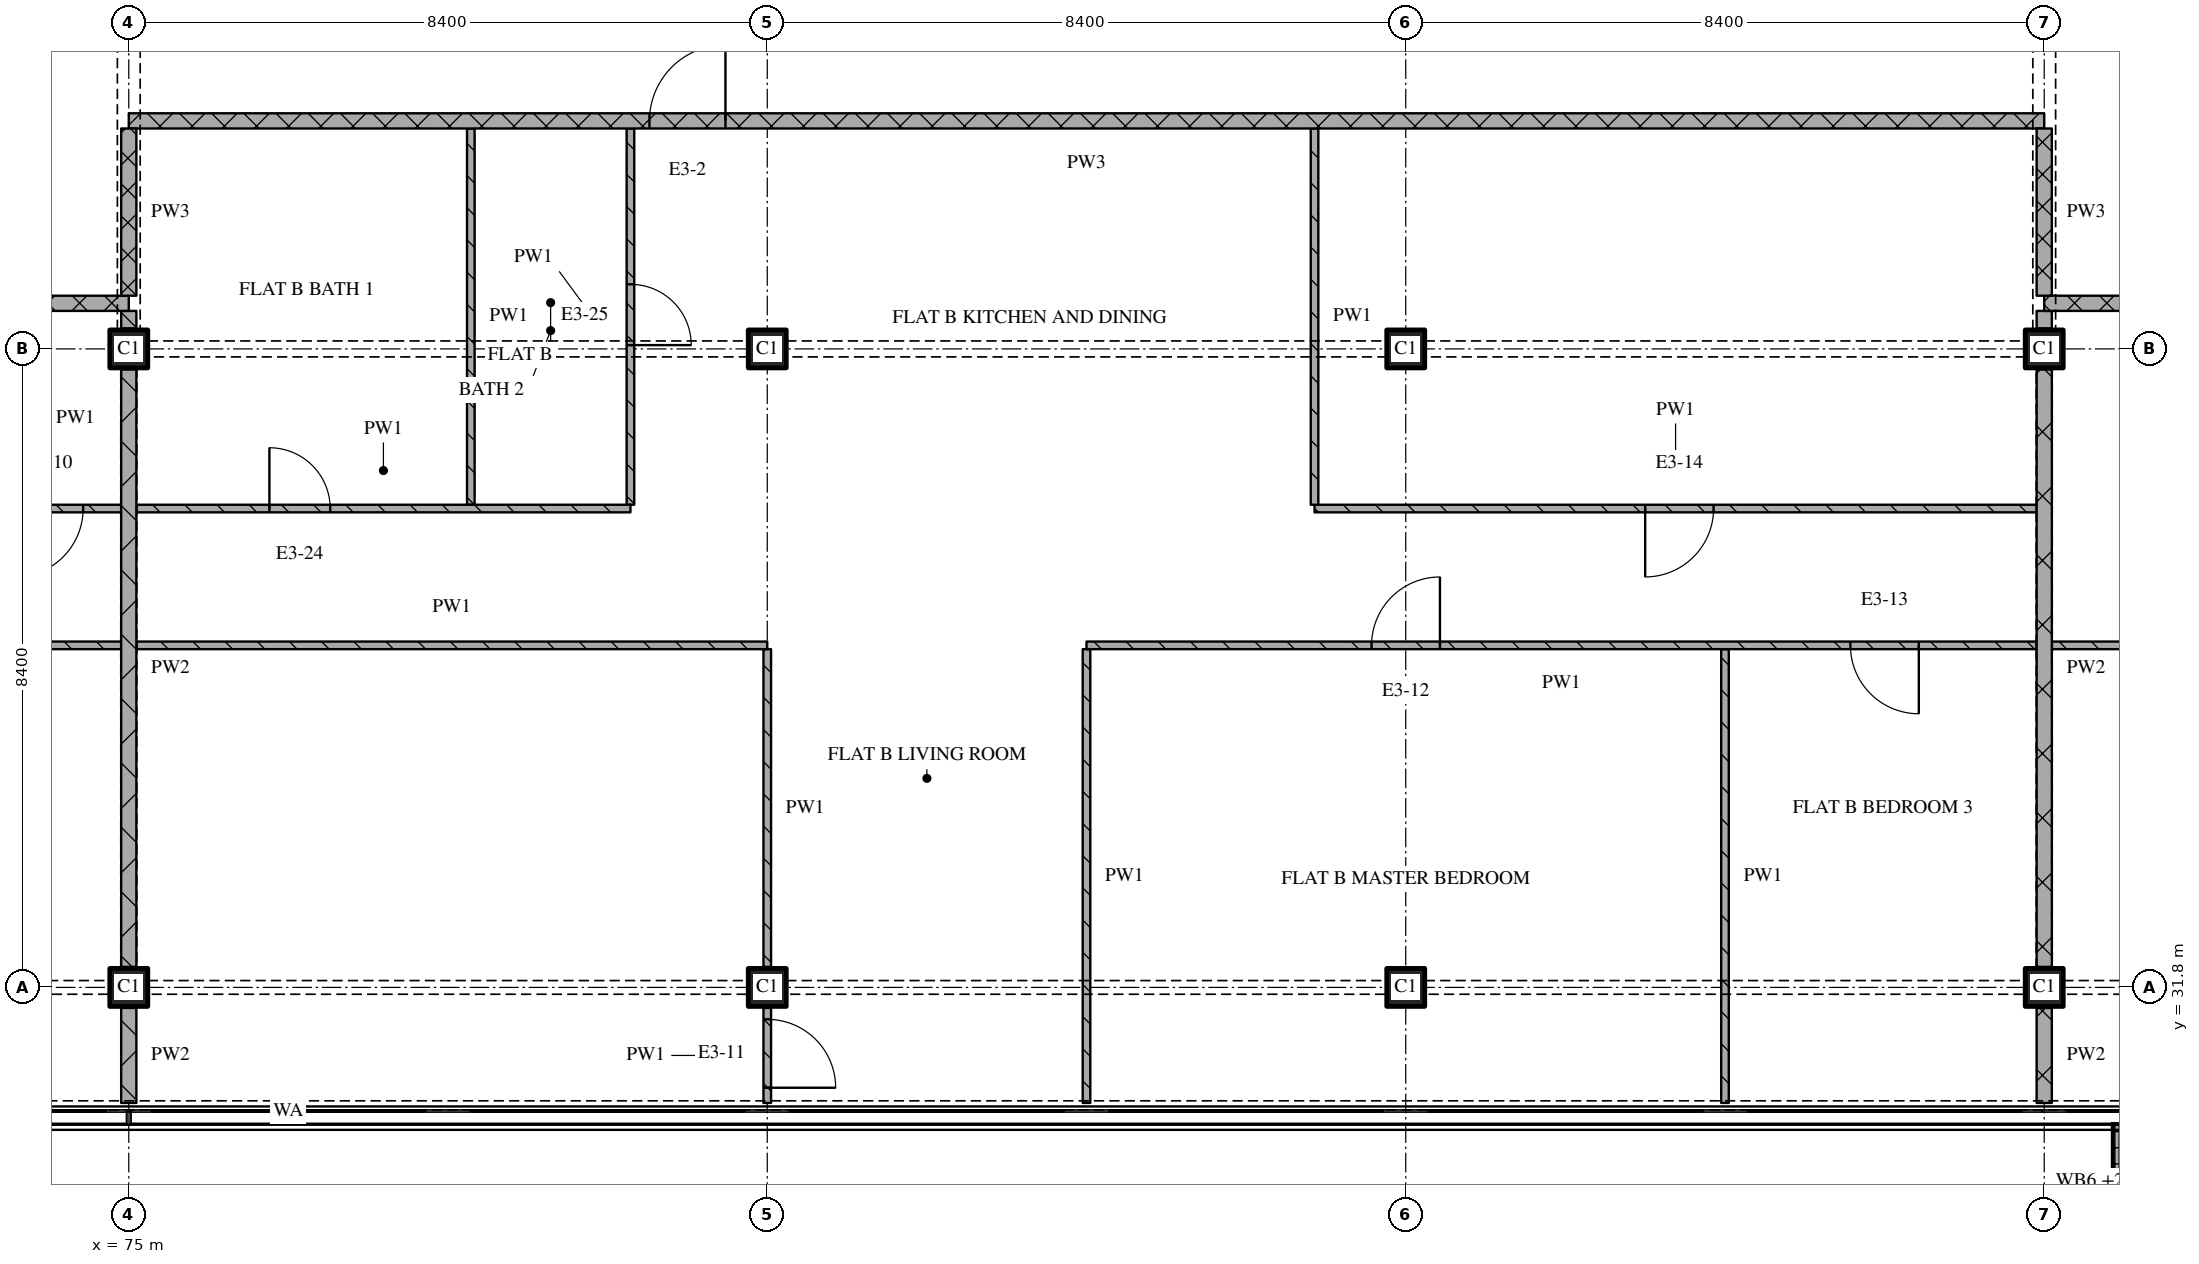
"""IFC4 building model, lengths in metres.
Left out: names, types, materials, properties, quantities, classifications, styles, units other than length and angle.
Written with IfcOpenShell. Run it as: python <this file> out.ifc"""

import sys

from ifc_helpers import new_model, si_unit, direction, frame, frame_2d, origin, origin_2d, place, context, subcontext, project, spatial, polyline, rectangle, outline, extrude, element, fill, save


model = new_model("IFC4")
c1 = context("Model", 3, precision=1e-05, world=origin(), true_north=direction((0.0, 1.0)))
c2 = subcontext(c1, "Body", "Model", "MODEL_VIEW")
j1 = project(units=[si_unit("LENGTHUNIT", "METRE"), si_unit("PLANEANGLEUNIT", "RADIAN")], contexts=[c1])
p1 = place(None, origin())
s1 = spatial("IfcSite", under=j1, at=p1, CompositionType="ELEMENT")
p2 = place(p1, origin())
s2 = spatial("IfcBuilding", under=s1, at=p2, CompositionType="ELEMENT")
p3 = place(p2, frame((0.0, 0.0, 281.55)))
s3 = spatial("IfcBuildingStorey", under=s2, at=p3, CompositionType="ELEMENT", Elevation=281.55)
for number, where, z_axis, x_axis in (
    (1, (75.0, 31.8, 0.0), (0.0, 0.0, 1.0), (1.0, 0.0, 0.0)),
    (2, (75.0, 40.2, 0.0), (0.0, 0.0, 1.0), (1.0, 0.0, 0.0)),
    (3, (83.4, 31.8, 0.0), (0.0, 0.0, 1.0), (1.0, 0.0, 0.0)),
    (4, (83.4, 40.2, 0.0), (0.0, 0.0, 1.0), (1.0, 0.0, 0.0)),
    (5, (91.8, 31.8, 0.0), (0.0, 0.0, 1.0), (1.0, 0.0, 0.0)),
    (6, (91.8, 40.2, 0.0), (0.0, 0.0, 1.0), (1.0, 0.0, 0.0)),
    (7, (100.2, 31.8, 0.0), (0.0, 0.0, 1.0), (1.0, 0.0, 0.0)),
    (8, (100.2, 40.2, 0.0), (0.0, 0.0, 1.0), (1.0, 0.0, 0.0)),
):
    element("IfcColumn", number, at=place(p3, frame(where, z_axis=z_axis, x_axis=x_axis)), inside=s3, PredefinedType="COLUMN", context=c2, shape_type="SweptSolid", body=[
        extrude(rectangle(XDim=0.5, YDim=0.5, at=origin_2d()), origin(), (0.0, 0.0, 1.0), 3.6),
    ])
p4 = place(p3, origin())
e9 = element("IfcWall", 9, at=p4, inside=s3, PredefinedType="SOLIDWALL", context=c2, shape_type="SweptSolid", body=[
    extrude(outline(polyline([(101.1, 30.0), (101.2, 30.0), (101.2, 28.5), (103.4, 28.5), (103.4, 30.0), (103.5, 30.0), (103.5, 28.4), (101.1, 28.4), (101.1, 30.0)])), origin(), (0.0, 0.0, 1.0), 1.0),
])
p5 = place(p3, frame((90.6, 38.1, 0.0), z_axis=(0.0, 0.0, 1.0), x_axis=(1.0, 0.0, 0.0)))
e10 = element("IfcWall", 10, at=p5, inside=s3, PredefinedType="PARTITIONING", context=c2, shape_type="SweptSolid", body=[
    extrude(rectangle(XDim=9.5, YDim=0.1, at=frame_2d((4.75, 0.0))), origin(), (0.0, 0.0, 1.0), 3.32),
])
p6 = place(p5, frame((4.35, 0.0, 0.0)))
e11 = element("IfcOpeningElement", 11, at=p6, cuts=e10, PredefinedType="OPENING", context=c2, shape_type="SweptSolid", body=[
    extrude(rectangle(XDim=0.9, YDim=2.1, at=frame_2d((0.45, 1.05))), frame((0.0, 0.06, 0.0), z_axis=(0.0, -1.0, 0.0), x_axis=(1.0, 0.0, 0.0)), (0.0, 0.0, 1.0), 0.12),
])
p7 = place(p3, frame((75.0, 40.8, 0.0), z_axis=(0.0, 0.0, 1.0), x_axis=(-1.0, 0.0, 0.0)))
e12 = element("IfcWall", 12, at=p7, inside=s3, PredefinedType="PARTITIONING", context=c2, shape_type="SweptSolid", body=[
    extrude(rectangle(XDim=18.32, YDim=0.2, at=frame_2d((9.16, 0.0))), origin(), (0.0, 0.0, 1.0), 3.32),
])
p8 = place(p7, frame((9.85, 0.0, 0.0)))
e13 = element("IfcOpeningElement", 13, at=p8, cuts=e12, PredefinedType="OPENING", context=c2, shape_type="SweptSolid", body=[
    extrude(rectangle(XDim=1.0, YDim=2.1, at=frame_2d((0.5, 1.05))), frame((0.0, 0.11, 0.0), z_axis=(0.0, -1.0, 0.0), x_axis=(1.0, 0.0, 0.0)), (0.0, 0.0, 1.0), 0.22),
])
p9 = place(p3, frame((118.52, 40.8, 0.0), z_axis=(0.0, 0.0, 1.0), x_axis=(-1.0, 0.0, 0.0)))
e14 = element("IfcWall", 14, at=p9, inside=s3, PredefinedType="PARTITIONING", context=c2, shape_type="SweptSolid", body=[
    extrude(rectangle(XDim=18.32, YDim=0.2, at=frame_2d((9.16, 0.0))), origin(), (0.0, 0.0, 1.0), 3.32),
])
p10 = place(p9, frame((7.77, 0.0, 0.0)))
e15 = element("IfcOpeningElement", 15, at=p10, cuts=e14, PredefinedType="OPENING", context=c2, shape_type="SweptSolid", body=[
    extrude(rectangle(XDim=1.0, YDim=2.1, at=frame_2d((0.5, 1.05))), frame((0.0, 0.11, 0.0), z_axis=(0.0, -1.0, 0.0), x_axis=(1.0, 0.0, 0.0)), (0.0, 0.0, 1.0), 0.22),
])
p11 = place(p3, frame((100.2, 43.2, 0.0), z_axis=(0.0, 0.0, 1.0), x_axis=(-1.0, 0.0, 0.0)))
e16 = element("IfcWall", 16, at=p11, inside=s3, PredefinedType="PARTITIONING", context=c2, shape_type="SweptSolid", body=[
    extrude(rectangle(XDim=25.2, YDim=0.2, at=frame_2d((12.6, 0.0))), origin(), (0.0, 0.0, 1.0), 3.32),
])
p12 = place(p11, frame((17.35, 0.0, 0.0)))
e17 = element("IfcOpeningElement", 17, at=p12, cuts=e16, PredefinedType="OPENING", context=c2, shape_type="SweptSolid", body=[
    extrude(rectangle(XDim=1.0, YDim=2.1, at=frame_2d((0.5, 1.05))), frame((0.0, 0.11, 0.0), z_axis=(0.0, -1.0, 0.0), x_axis=(1.0, 0.0, 0.0)), (0.0, 0.0, 1.0), 0.22),
])
p13 = place(p3, frame((75.0, 43.1, 0.0), z_axis=(0.0, 0.0, 1.0), x_axis=(0.0, -1.0, 0.0)))
e18 = element("IfcWall", 18, at=p13, inside=s3, PredefinedType="PARTITIONING", context=c2, shape_type="SweptSolid", body=[
    extrude(rectangle(XDim=2.2, YDim=0.2, at=frame_2d((1.1, 0.0))), origin(), (0.0, 0.0, 1.0), 2.53),
])
p14 = place(p3, frame((75.0, 31.53, 0.0), z_axis=(0.0, 0.0, 1.0), x_axis=(0.0, -1.0, 0.0)))
e19 = element("IfcWall", 19, at=p14, inside=s3, PredefinedType="PARTITIONING", context=c2, shape_type="SweptSolid", body=[
    extrude(rectangle(XDim=1.25, YDim=0.2, at=frame_2d((0.625, 0.0))), origin(), (0.0, 0.0, 1.0), 3.32),
])
p15 = place(p3, frame((75.0, 39.93, 0.0), z_axis=(0.0, 0.0, 1.0), x_axis=(0.0, -1.0, 0.0)))
e20 = element("IfcWall", 20, at=p15, inside=s3, PredefinedType="PARTITIONING", context=c2, shape_type="SweptSolid", body=[
    extrude(rectangle(XDim=7.86, YDim=0.2, at=frame_2d((3.93, 0.0))), origin(), (0.0, 0.0, 1.0), 2.83),
])
p16 = place(p3, frame((75.0, 40.7, 0.0), z_axis=(0.0, 0.0, 1.0), x_axis=(0.0, -1.0, 0.0)))
e21 = element("IfcWall", 21, at=p16, inside=s3, PredefinedType="PARTITIONING", context=c2, shape_type="SweptSolid", body=[
    extrude(rectangle(XDim=0.23, YDim=0.2, at=frame_2d((0.115, 0.0))), origin(), (0.0, 0.0, 1.0), 3.32),
])
p17 = place(p3, frame((79.5, 43.1, 0.0), z_axis=(0.0, 0.0, 1.0), x_axis=(0.0, -1.0, 0.0)))
e22 = element("IfcWall", 22, at=p17, inside=s3, PredefinedType="PARTITIONING", context=c2, shape_type="SweptSolid", body=[
    extrude(rectangle(XDim=4.95, YDim=0.1, at=frame_2d((2.475, 0.0))), origin(), (0.0, 0.0, 1.0), 3.32),
])
p18 = place(p3, frame((81.6, 38.15, 0.0), z_axis=(0.0, 0.0, 1.0), x_axis=(0.0, 1.0, 0.0)))
e23 = element("IfcWall", 23, at=p18, inside=s3, PredefinedType="PARTITIONING", context=c2, shape_type="SweptSolid", body=[
    extrude(rectangle(XDim=4.95, YDim=0.1, at=frame_2d((2.475, 0.0))), origin(), (0.0, 0.0, 1.0), 3.32),
])
p19 = place(p18, frame((2.1, 0.0, 0.0)))
e24 = element("IfcOpeningElement", 24, at=p19, cuts=e23, PredefinedType="OPENING", context=c2, shape_type="SweptSolid", body=[
    extrude(rectangle(XDim=0.8, YDim=2.1, at=frame_2d((0.4, 1.05))), frame((0.0, 0.06, 0.0), z_axis=(0.0, -1.0, 0.0), x_axis=(1.0, 0.0, 0.0)), (0.0, 0.0, 1.0), 0.12),
])
p20 = place(p3, frame((83.4, 30.28, 0.0), z_axis=(0.0, 0.0, 1.0), x_axis=(0.0, 1.0, 0.0)))
e25 = element("IfcWall", 25, at=p20, inside=s3, PredefinedType="PARTITIONING", context=c2, shape_type="SweptSolid", body=[
    extrude(rectangle(XDim=1.25, YDim=0.1, at=frame_2d((0.625, 0.0))), origin(), (0.0, 0.0, 1.0), 3.32),
])
p21 = place(p20, frame((0.2, 0.0, 0.0)))
e26 = element("IfcOpeningElement", 26, at=p21, cuts=e25, PredefinedType="OPENING", context=c2, shape_type="SweptSolid", body=[
    extrude(rectangle(XDim=0.9, YDim=2.1, at=frame_2d((0.45, 1.05))), frame((0.0, 0.06, 0.0), z_axis=(0.0, -1.0, 0.0), x_axis=(1.0, 0.0, 0.0)), (0.0, 0.0, 1.0), 0.12),
])
p22 = place(p3, frame((83.4, 36.25, 0.0), z_axis=(0.0, 0.0, 1.0), x_axis=(0.0, -1.0, 0.0)))
e27 = element("IfcWall", 27, at=p22, inside=s3, PredefinedType="PARTITIONING", context=c2, shape_type="SweptSolid", body=[
    extrude(rectangle(XDim=4.18, YDim=0.1, at=frame_2d((2.09, 0.0))), origin(), (0.0, 0.0, 1.0), 2.83),
])
p23 = place(p3, frame((87.6, 36.25, 0.0), z_axis=(0.0, 0.0, 1.0), x_axis=(0.0, -1.0, 0.0)))
e28 = element("IfcWall", 28, at=p23, inside=s3, PredefinedType="PARTITIONING", context=c2, shape_type="SweptSolid", body=[
    extrude(rectangle(XDim=5.97, YDim=0.1, at=frame_2d((2.985, 0.0))), origin(), (0.0, 0.0, 1.0), 3.32),
])
p24 = place(p3, frame((90.6, 43.1, 0.0), z_axis=(0.0, 0.0, 1.0), x_axis=(0.0, -1.0, 0.0)))
e29 = element("IfcWall", 29, at=p24, inside=s3, PredefinedType="PARTITIONING", context=c2, shape_type="SweptSolid", body=[
    extrude(rectangle(XDim=4.95, YDim=0.1, at=frame_2d((2.475, 0.0))), origin(), (0.0, 0.0, 1.0), 3.32),
])
p25 = place(p3, frame((96.0, 36.25, 0.0), z_axis=(0.0, 0.0, 1.0), x_axis=(0.0, -1.0, 0.0)))
e30 = element("IfcWall", 30, at=p25, inside=s3, PredefinedType="PARTITIONING", context=c2, shape_type="SweptSolid", body=[
    extrude(rectangle(XDim=5.97, YDim=0.1, at=frame_2d((2.985, 0.0))), origin(), (0.0, 0.0, 1.0), 3.32),
])
p26 = place(p3, frame((100.2, 43.1, 0.0), z_axis=(0.0, 0.0, 1.0), x_axis=(0.0, -1.0, 0.0)))
e31 = element("IfcWall", 31, at=p26, inside=s3, PredefinedType="PARTITIONING", context=c2, shape_type="SweptSolid", body=[
    extrude(rectangle(XDim=2.2, YDim=0.2, at=frame_2d((1.1, 0.0))), origin(), (0.0, 0.0, 1.0), 2.53),
])
p27 = place(p3, frame((100.2, 31.53, 0.0), z_axis=(0.0, 0.0, 1.0), x_axis=(0.0, -1.0, 0.0)))
e32 = element("IfcWall", 32, at=p27, inside=s3, PredefinedType="PARTITIONING", context=c2, shape_type="SweptSolid", body=[
    extrude(rectangle(XDim=1.25, YDim=0.2, at=frame_2d((0.625, 0.0))), origin(), (0.0, 0.0, 1.0), 3.32),
])
p28 = place(p3, frame((100.2, 39.93, 0.0), z_axis=(0.0, 0.0, 1.0), x_axis=(0.0, -1.0, 0.0)))
e33 = element("IfcWall", 33, at=p28, inside=s3, PredefinedType="PARTITIONING", context=c2, shape_type="SweptSolid", body=[
    extrude(rectangle(XDim=7.86, YDim=0.2, at=frame_2d((3.93, 0.0))), origin(), (0.0, 0.0, 1.0), 2.83),
])
p29 = place(p3, frame((100.2, 40.7, 0.0), z_axis=(0.0, 0.0, 1.0), x_axis=(0.0, -1.0, 0.0)))
e34 = element("IfcWall", 34, at=p29, inside=s3, PredefinedType="PARTITIONING", context=c2, shape_type="SweptSolid", body=[
    extrude(rectangle(XDim=0.23, YDim=0.2, at=frame_2d((0.115, 0.0))), origin(), (0.0, 0.0, 1.0), 3.32),
])
p30 = place(p3, frame((74.9, 36.3, 0.0), z_axis=(0.0, 0.0, 1.0), x_axis=(-1.0, 0.0, 0.0)))
e35 = element("IfcWall", 35, at=p30, inside=s3, PredefinedType="PARTITIONING", context=c2, shape_type="SweptSolid", body=[
    extrude(rectangle(XDim=8.3, YDim=0.1, at=frame_2d((4.15, 0.0))), origin(), (0.0, 0.0, 1.0), 3.32),
])
p31 = place(p30, frame((3.65, 0.0, 0.0)))
e36 = element("IfcOpeningElement", 36, at=p31, cuts=e35, PredefinedType="OPENING", context=c2, shape_type="SweptSolid", body=[
    extrude(rectangle(XDim=0.9, YDim=2.1, at=frame_2d((0.45, 1.05))), frame((0.0, 0.06, 0.0), z_axis=(0.0, -1.0, 0.0), x_axis=(1.0, 0.0, 0.0)), (0.0, 0.0, 1.0), 0.12),
])
p32 = place(p3, frame((75.1, 36.3, 0.0), z_axis=(0.0, 0.0, 1.0), x_axis=(1.0, 0.0, 0.0)))
e37 = element("IfcWall", 37, at=p32, inside=s3, PredefinedType="PARTITIONING", context=c2, shape_type="SweptSolid", body=[
    extrude(rectangle(XDim=8.3, YDim=0.1, at=frame_2d((4.15, 0.0))), origin(), (0.0, 0.0, 1.0), 3.32),
])
p33 = place(p3, frame((100.1, 36.3, 0.0), z_axis=(0.0, 0.0, 1.0), x_axis=(-1.0, 0.0, 0.0)))
e38 = element("IfcWall", 38, at=p33, inside=s3, PredefinedType="PARTITIONING", context=c2, shape_type="SweptSolid", body=[
    extrude(rectangle(XDim=12.5, YDim=0.1, at=frame_2d((6.25, 0.0))), origin(), (0.0, 0.0, 1.0), 3.32),
])
p34 = place(p33, frame((1.55, 0.0, 0.0)))
e39 = element("IfcOpeningElement", 39, at=p34, cuts=e38, PredefinedType="OPENING", context=c2, shape_type="SweptSolid", body=[
    extrude(rectangle(XDim=0.9, YDim=2.1, at=frame_2d((0.45, 1.05))), frame((0.0, 0.06, 0.0), z_axis=(0.0, -1.0, 0.0), x_axis=(1.0, 0.0, 0.0)), (0.0, 0.0, 1.0), 0.12),
])
p35 = place(p33, frame((7.85, 0.0, 0.0)))
e40 = element("IfcOpeningElement", 40, at=p35, cuts=e38, PredefinedType="OPENING", context=c2, shape_type="SweptSolid", body=[
    extrude(rectangle(XDim=0.9, YDim=2.1, at=frame_2d((0.45, 1.05))), frame((0.0, 0.06, 0.0), z_axis=(0.0, -1.0, 0.0), x_axis=(1.0, 0.0, 0.0)), (0.0, 0.0, 1.0), 0.12),
])
p36 = place(p3, frame((100.3, 36.3, 0.0), z_axis=(0.0, 0.0, 1.0), x_axis=(1.0, 0.0, 0.0)))
e41 = element("IfcWall", 41, at=p36, inside=s3, PredefinedType="PARTITIONING", context=c2, shape_type="SweptSolid", body=[
    extrude(rectangle(XDim=8.3, YDim=0.1, at=frame_2d((4.15, 0.0))), origin(), (0.0, 0.0, 1.0), 3.32),
])
p37 = place(p3, frame((72.9, 38.1, 0.0), z_axis=(0.0, 0.0, 1.0), x_axis=(1.0, 0.0, 0.0)))
e42 = element("IfcWall", 42, at=p37, inside=s3, PredefinedType="PARTITIONING", context=c2, shape_type="SweptSolid", body=[
    extrude(rectangle(XDim=2.0, YDim=0.1, at=frame_2d((1.0, 0.0))), origin(), (0.0, 0.0, 1.0), 3.32),
])
p38 = place(p37, frame((0.6, 0.0, 0.0)))
e43 = element("IfcOpeningElement", 43, at=p38, cuts=e42, PredefinedType="OPENING", context=c2, shape_type="SweptSolid", body=[
    extrude(rectangle(XDim=0.9, YDim=2.1, at=frame_2d((0.45, 1.05))), frame((0.0, 0.06, 0.0), z_axis=(0.0, -1.0, 0.0), x_axis=(1.0, 0.0, 0.0)), (0.0, 0.0, 1.0), 0.12),
])
p39 = place(p3, frame((75.1, 38.1, 0.0), z_axis=(0.0, 0.0, 1.0), x_axis=(1.0, 0.0, 0.0)))
e44 = element("IfcWall", 44, at=p39, inside=s3, PredefinedType="PARTITIONING", context=c2, shape_type="SweptSolid", body=[
    extrude(rectangle(XDim=6.5, YDim=0.1, at=frame_2d((3.25, 0.0))), origin(), (0.0, 0.0, 1.0), 3.32),
])
p40 = place(p39, frame((1.75, 0.0, 0.0)))
e45 = element("IfcOpeningElement", 45, at=p40, cuts=e44, PredefinedType="OPENING", context=c2, shape_type="SweptSolid", body=[
    extrude(rectangle(XDim=0.8, YDim=2.1, at=frame_2d((0.4, 1.05))), frame((0.0, 0.06, 0.0), z_axis=(0.0, -1.0, 0.0), x_axis=(1.0, 0.0, 0.0)), (0.0, 0.0, 1.0), 0.12),
])
p41 = place(p6, origin())
e46 = element("IfcDoor", 46, at=p41, inside=s3, OperationType="SINGLE_SWING_RIGHT", PredefinedType="DOOR", context=c2, shape_type="SweptSolid", body=[
    extrude(rectangle(XDim=0.9, YDim=2.1, at=frame_2d((0.45, 1.05))), frame((0.0, 0.025, 0.0), z_axis=(0.0, -1.0, 0.0), x_axis=(1.0, 0.0, 0.0)), (0.0, 0.0, 1.0), 0.05),
])
fill(e11, e46)
p42 = place(p12, origin())
e47 = element("IfcDoor", 47, at=p42, inside=s3, OperationType="SINGLE_SWING_RIGHT", PredefinedType="DOOR", context=c2, shape_type="SweptSolid", body=[
    extrude(rectangle(XDim=1.0, YDim=2.1, at=frame_2d((0.5, 1.05))), frame((0.0, 0.025, 0.0), z_axis=(0.0, -1.0, 0.0), x_axis=(1.0, 0.0, 0.0)), (0.0, 0.0, 1.0), 0.05),
])
fill(e17, e47)
p43 = place(p19, origin())
e48 = element("IfcDoor", 48, at=p43, inside=s3, OperationType="SINGLE_SWING_RIGHT", PredefinedType="DOOR", context=c2, shape_type="SweptSolid", body=[
    extrude(rectangle(XDim=0.8, YDim=2.1, at=frame_2d((0.4, 1.05))), frame((0.0, 0.025, 0.0), z_axis=(0.0, -1.0, 0.0), x_axis=(1.0, 0.0, 0.0)), (0.0, 0.0, 1.0), 0.05),
])
fill(e24, e48)
p44 = place(p21, origin())
e49 = element("IfcDoor", 49, at=p44, inside=s3, OperationType="SINGLE_SWING_RIGHT", PredefinedType="DOOR", context=c2, shape_type="SweptSolid", body=[
    extrude(rectangle(XDim=0.9, YDim=2.1, at=frame_2d((0.45, 1.05))), frame((0.0, 0.025, 0.0), z_axis=(0.0, -1.0, 0.0), x_axis=(1.0, 0.0, 0.0)), (0.0, 0.0, 1.0), 0.05),
])
fill(e26, e49)
p45 = place(p34, origin())
e50 = element("IfcDoor", 50, at=p45, inside=s3, OperationType="SINGLE_SWING_LEFT", PredefinedType="DOOR", context=c2, shape_type="SweptSolid", body=[
    extrude(rectangle(XDim=0.9, YDim=2.1, at=frame_2d((0.45, 1.05))), frame((0.0, 0.025, 0.0), z_axis=(0.0, -1.0, 0.0), x_axis=(1.0, 0.0, 0.0)), (0.0, 0.0, 1.0), 0.05),
])
fill(e39, e50)
p46 = place(p35, origin())
e51 = element("IfcDoor", 51, at=p46, inside=s3, OperationType="SINGLE_SWING_RIGHT", PredefinedType="DOOR", context=c2, shape_type="SweptSolid", body=[
    extrude(rectangle(XDim=0.9, YDim=2.1, at=frame_2d((0.45, 1.05))), frame((0.0, 0.025, 0.0), z_axis=(0.0, -1.0, 0.0), x_axis=(1.0, 0.0, 0.0)), (0.0, 0.0, 1.0), 0.05),
])
fill(e40, e51)
p47 = place(p38, origin())
e52 = element("IfcDoor", 52, at=p47, inside=s3, OperationType="SINGLE_SWING_RIGHT", PredefinedType="DOOR", context=c2, shape_type="SweptSolid", body=[
    extrude(rectangle(XDim=0.9, YDim=2.1, at=frame_2d((0.45, 1.05))), frame((0.0, 0.025, 0.0), z_axis=(0.0, -1.0, 0.0), x_axis=(1.0, 0.0, 0.0)), (0.0, 0.0, 1.0), 0.05),
])
fill(e43, e52)
p48 = place(p40, origin())
e53 = element("IfcDoor", 53, at=p48, inside=s3, OperationType="SINGLE_SWING_LEFT", PredefinedType="DOOR", context=c2, shape_type="SweptSolid", body=[
    extrude(rectangle(XDim=0.8, YDim=2.1, at=frame_2d((0.4, 1.05))), frame((0.0, 0.025, 0.0), z_axis=(0.0, -1.0, 0.0), x_axis=(1.0, 0.0, 0.0)), (0.0, 0.0, 1.0), 0.05),
])
fill(e45, e53)
save(model, sys.argv[1])
